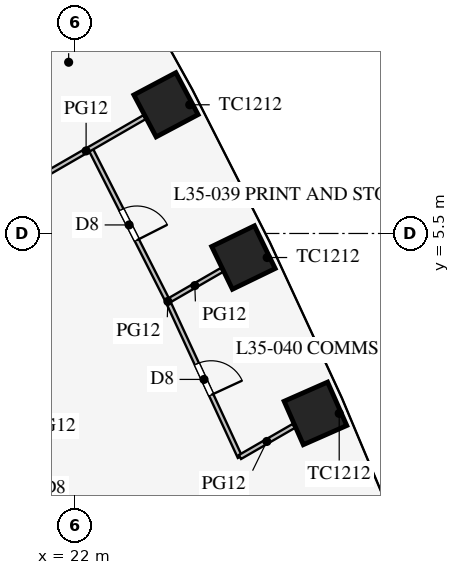
"""IFC4 building model, lengths in metres.
Left out: names, types, materials, properties, quantities, classifications, styles, units other than length and angle.
Written with IfcOpenShell. Run it as: python <this file> out.ifc"""

import sys

from ifc_helpers import new_model, si_unit, direction, frame, frame_2d, origin, origin_2d, place, context, subcontext, project, spatial, rectangle, extrude, element, fill, save


model = new_model("IFC4")
c1 = context("Model", 3, precision=1e-05, world=origin(), true_north=direction((0.0, 1.0)))
c2 = subcontext(c1, "Body", "Model", "MODEL_VIEW")
j1 = project(units=[si_unit("LENGTHUNIT", "METRE"), si_unit("PLANEANGLEUNIT", "RADIAN")], contexts=[c1])
p1 = place(None, origin())
s1 = spatial("IfcSite", under=j1, at=p1, CompositionType="ELEMENT")
p2 = place(p1, origin())
s2 = spatial("IfcBuilding", under=s1, at=p2, CompositionType="ELEMENT")
p3 = place(p2, frame((0.0, 0.0, 153.5)))
s3 = spatial("IfcBuildingStorey", under=s2, at=p3, CompositionType="ELEMENT", Elevation=153.5)
for number, where, z_axis, x_axis in (
    (1, (28.325, 0.765, 0.0), (0.0, 0.0, 1.0), (-0.403, 0.915, 0.0)),
    (2, (26.43, 4.867, 0.0), (0.0, 0.0, 1.0), (-0.436, 0.9, 0.0)),
    (3, (24.393, 8.887, 0.0), (0.0, 0.0, 1.0), (-0.468, 0.883, 0.0)),
):
    element("IfcColumn", number, at=place(p3, frame(where, z_axis=z_axis, x_axis=x_axis)), inside=s3, PredefinedType="COLUMN", context=c2, shape_type="SweptSolid", body=[
        extrude(rectangle(XDim=1.25, YDim=1.25, at=origin_2d()), origin(), (0.0, 0.0, 1.0), 4.2),
    ])
p4 = place(p3, frame((26.338, -0.382, 0.0), z_axis=(0.0, 0.0, 1.0), x_axis=(-0.419948870618, 0.907547765171, 0.0)))
e4 = element("IfcWall", 4, at=p4, inside=s3, PredefinedType="PARTITIONING", context=c2, shape_type="SweptSolid", body=[
    extrude(rectangle(XDim=4.518, YDim=0.12, at=frame_2d((2.259, 0.0))), origin(), (0.0, 0.0, 1.0), 2.9),
])
p5 = place(p4, frame((1.8, 0.0, 0.15)))
e5 = element("IfcOpeningElement", 5, at=p5, cuts=e4, PredefinedType="OPENING", context=c2, shape_type="SweptSolid", body=[
    extrude(rectangle(XDim=0.9, YDim=2.1, at=frame_2d((0.45, 1.05))), frame((0.0, 0.07, 0.0), z_axis=(0.0, -1.0, 0.0), x_axis=(1.0, 0.0, 0.0)), (0.0, 0.0, 1.0), 0.14),
])
p6 = place(p3, frame((24.44, 3.718, 0.0), z_axis=(0.0, 0.0, 1.0), x_axis=(-0.452471679136, 0.891778772779, 0.0)))
e6 = element("IfcWall", 6, at=p6, inside=s3, PredefinedType="PARTITIONING", context=c2, shape_type="SweptSolid", body=[
    extrude(rectangle(XDim=4.507, YDim=0.12, at=frame_2d((2.253, 0.0))), origin(), (0.0, 0.0, 1.0), 2.9),
])
p7 = place(p6, frame((1.8, 0.0, 0.15)))
e7 = element("IfcOpeningElement", 7, at=p7, cuts=e6, PredefinedType="OPENING", context=c2, shape_type="SweptSolid", body=[
    extrude(rectangle(XDim=0.9, YDim=2.1, at=frame_2d((0.45, 1.05))), frame((0.0, 0.07, 0.0), z_axis=(0.0, -1.0, 0.0), x_axis=(1.0, 0.0, 0.0)), (0.0, 0.0, 1.0), 0.14),
])
p8 = place(p3, frame((26.338, -0.382, 0.0), z_axis=(0.0, 0.0, 1.0), x_axis=(0.866058885866, 0.499942002849, 0.0)))
e8 = element("IfcWall", 8, at=p8, inside=s3, PredefinedType="PARTITIONING", context=c2, shape_type="SweptSolid", body=[
    extrude(rectangle(XDim=1.636, YDim=0.12, at=frame_2d((0.818, 0.0))), origin(), (0.0, 0.0, 1.0), 2.6),
])
p9 = place(p3, frame((20.756, 6.787, 0.0), z_axis=(0.0, 0.0, 1.0), x_axis=(0.866038754309, 0.499976875499, 0.0)))
e9 = element("IfcWall", 9, at=p9, inside=s3, PredefinedType="PARTITIONING", context=c2, shape_type="SweptSolid", body=[
    extrude(rectangle(XDim=3.544, YDim=0.12, at=frame_2d((1.772, 0.0))), origin(), (0.0, 0.0, 1.0), 2.8),
])
p10 = place(p3, frame((24.44, 3.718, 0.0), z_axis=(0.0, 0.0, 1.0), x_axis=(0.866046869545, 0.499962818368, 0.0)))
e10 = element("IfcWall", 10, at=p10, inside=s3, PredefinedType="PARTITIONING", context=c2, shape_type="SweptSolid", body=[
    extrude(rectangle(XDim=1.641, YDim=0.12, at=frame_2d((0.821, 0.0))), origin(), (0.0, 0.0, 1.0), 2.9),
])
p11 = place(p7, frame((0.9, 0.0, 0.0), z_axis=(0.0, 0.0, 1.0), x_axis=(-1.0, 0.0, 0.0)))
e11 = element("IfcDoor", 11, at=p11, inside=s3, OperationType="SINGLE_SWING_RIGHT", PredefinedType="DOOR", context=c2, shape_type="SweptSolid", body=[
    extrude(rectangle(XDim=0.9, YDim=2.1, at=frame_2d((0.45, 1.05))), frame((0.0, 0.025, 0.0), z_axis=(0.0, -1.0, 0.0), x_axis=(1.0, 0.0, 0.0)), (0.0, 0.0, 1.0), 0.05),
])
fill(e7, e11)
p12 = place(p5, frame((0.9, 0.0, 0.0), z_axis=(0.0, 0.0, 1.0), x_axis=(-1.0, 0.0, 0.0)))
e12 = element("IfcDoor", 12, at=p12, inside=s3, OperationType="SINGLE_SWING_RIGHT", PredefinedType="DOOR", context=c2, shape_type="SweptSolid", body=[
    extrude(rectangle(XDim=0.9, YDim=2.1, at=frame_2d((0.45, 1.05))), frame((0.0, 0.025, 0.0), z_axis=(0.0, -1.0, 0.0), x_axis=(1.0, 0.0, 0.0)), (0.0, 0.0, 1.0), 0.05),
])
fill(e5, e12)
save(model, sys.argv[1])
